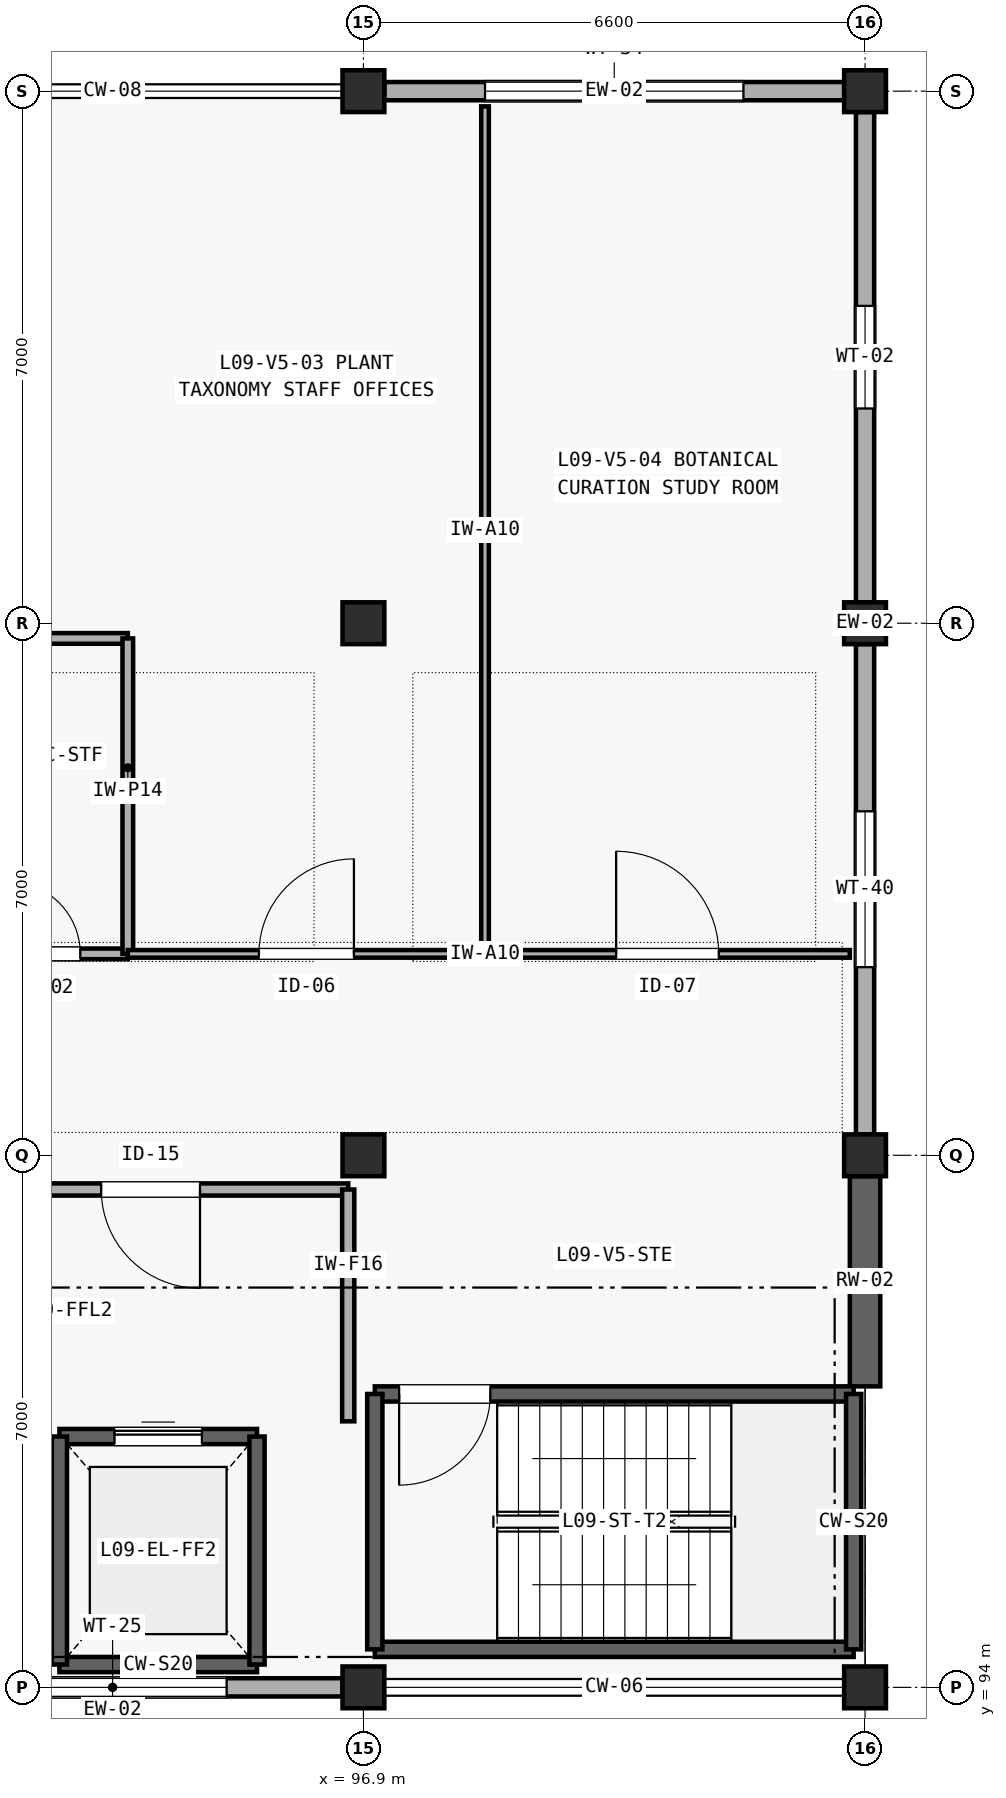
"""IFC4 building model, lengths in metres.
Left out: names, types, materials, properties, quantities, classifications, styles, units other than length and angle.
Written with IfcOpenShell. Run it as: python <this file> out.ifc"""

import sys

from ifc_helpers import new_model, si_unit, direction, frame, frame_2d, origin, origin_2d, place, context, subcontext, project, spatial, rectangle, extrude, element, fill, save


model = new_model("IFC4")
c1 = context("Model", 3, precision=1e-05, world=origin(), true_north=direction((0.0, 1.0)))
c2 = subcontext(c1, "Body", "Model", "MODEL_VIEW")
j1 = project(units=[si_unit("LENGTHUNIT", "METRE"), si_unit("PLANEANGLEUNIT", "RADIAN")], contexts=[c1])
p1 = place(None, origin())
s1 = spatial("IfcSite", under=j1, at=p1, CompositionType="ELEMENT")
p2 = place(p1, origin())
s2 = spatial("IfcBuilding", under=s1, at=p2, CompositionType="ELEMENT")
p3 = place(p2, frame((0.0, 0.0, 37.8)))
s3 = spatial("IfcBuildingStorey", under=s2, at=p3, CompositionType="ELEMENT", Elevation=37.8)
for number, where, z_axis, x_axis in (
    (1, (96.9, 94.0, 0.0), (0.0, 0.0, 1.0), (1.0, 0.0, 0.0)),
    (2, (96.9, 101.0, 0.0), (0.0, 0.0, 1.0), (1.0, 0.0, 0.0)),
    (3, (96.9, 108.0, 0.0), (0.0, 0.0, 1.0), (1.0, 0.0, 0.0)),
    (4, (96.9, 115.0, 0.0), (0.0, 0.0, 1.0), (1.0, 0.0, 0.0)),
    (5, (103.5, 94.0, 0.0), (0.0, 0.0, 1.0), (1.0, 0.0, 0.0)),
    (6, (103.5, 101.0, 0.0), (0.0, 0.0, 1.0), (1.0, 0.0, 0.0)),
    (7, (103.5, 108.0, 0.0), (0.0, 0.0, 1.0), (1.0, 0.0, 0.0)),
    (8, (103.5, 115.0, 0.0), (0.0, 0.0, 1.0), (1.0, 0.0, 0.0)),
):
    element("IfcColumn", number, at=place(p3, frame(where, z_axis=z_axis, x_axis=x_axis)), inside=s3, PredefinedType="COLUMN", context=c2, shape_type="SweptSolid", body=[
        extrude(rectangle(XDim=0.55, YDim=0.55, at=origin_2d()), origin(), (0.0, 0.0, 1.0), 4.2),
    ])
p4 = place(p3, frame((90.575, 94.0, 0.0), z_axis=(0.0, 0.0, 1.0), x_axis=(1.0, 0.0, 0.0)))
e9 = element("IfcWall", 9, at=p4, inside=s3, PredefinedType="SOLIDWALL", context=c2, shape_type="SweptSolid", body=[
    extrude(rectangle(XDim=6.05, YDim=0.24, at=frame_2d((3.025, 0.0))), origin(), (0.0, 0.0, 1.0), 3.385),
])
p5 = place(p4, frame((1.525, 0.0, 0.85)))
e10 = element("IfcOpeningElement", 10, at=p5, cuts=e9, PredefinedType="OPENING", context=c2, shape_type="SweptSolid", body=[
    extrude(rectangle(XDim=3.0, YDim=1.6, at=frame_2d((1.5, 0.8))), frame((0.0, 0.13, 0.0), z_axis=(0.0, -1.0, 0.0), x_axis=(1.0, 0.0, 0.0)), (0.0, 0.0, 1.0), 0.26),
])
p6 = place(p3, frame((97.175, 115.0, 0.0), z_axis=(0.0, 0.0, 1.0), x_axis=(1.0, 0.0, 0.0)))
e11 = element("IfcWall", 11, at=p6, inside=s3, PredefinedType="SOLIDWALL", context=c2, shape_type="SweptSolid", body=[
    extrude(rectangle(XDim=6.05, YDim=0.24, at=frame_2d((3.025, 0.0))), origin(), (0.0, 0.0, 1.0), 3.345),
])
p7 = place(p6, frame((1.325, 0.0, 0.85)))
e12 = element("IfcOpeningElement", 12, at=p7, cuts=e11, PredefinedType="OPENING", context=c2, shape_type="SweptSolid", body=[
    extrude(rectangle(XDim=3.4, YDim=1.2, at=frame_2d((1.7, 0.6))), frame((0.0, 0.13, 0.0), z_axis=(0.0, -1.0, 0.0), x_axis=(1.0, 0.0, 0.0)), (0.0, 0.0, 1.0), 0.26),
])
p8 = place(p3, frame((103.5, 97.96, 0.0), z_axis=(0.0, 0.0, 1.0), x_axis=(0.0, 1.0, 0.0)))
e13 = element("IfcWall", 13, at=p8, inside=s3, PredefinedType="SHEAR", context=c2, shape_type="SweptSolid", body=[
    extrude(rectangle(XDim=2.765, YDim=0.4, at=frame_2d((1.383, 0.0))), origin(), (0.0, 0.0, 1.0), 3.85),
])
p9 = place(p3, frame((103.5, 101.275, 0.0), z_axis=(0.0, 0.0, 1.0), x_axis=(0.0, 1.0, 0.0)))
e14 = element("IfcWall", 14, at=p9, inside=s3, PredefinedType="SOLIDWALL", context=c2, shape_type="SweptSolid", body=[
    extrude(rectangle(XDim=6.45, YDim=0.24, at=frame_2d((3.225, 0.0))), origin(), (0.0, 0.0, 1.0), 3.565),
])
p10 = place(p9, frame((2.2, 0.0, 0.85)))
e15 = element("IfcOpeningElement", 15, at=p10, cuts=e14, PredefinedType="OPENING", context=c2, shape_type="SweptSolid", body=[
    extrude(rectangle(XDim=2.05, YDim=1.55, at=frame_2d((1.025, 0.775))), frame((0.0, 0.13, 0.0), z_axis=(0.0, -1.0, 0.0), x_axis=(1.0, 0.0, 0.0)), (0.0, 0.0, 1.0), 0.26),
])
p11 = place(p3, frame((103.5, 108.275, 0.0), z_axis=(0.0, 0.0, 1.0), x_axis=(0.0, 1.0, 0.0)))
e16 = element("IfcWall", 16, at=p11, inside=s3, PredefinedType="SOLIDWALL", context=c2, shape_type="SweptSolid", body=[
    extrude(rectangle(XDim=6.45, YDim=0.24, at=frame_2d((3.225, 0.0))), origin(), (0.0, 0.0, 1.0), 3.565),
])
p12 = place(p11, frame((2.55, 0.0, 0.85)))
e17 = element("IfcOpeningElement", 17, at=p12, cuts=e16, PredefinedType="OPENING", context=c2, shape_type="SweptSolid", body=[
    extrude(rectangle(XDim=1.35, YDim=1.35, at=frame_2d((0.675, 0.675))), frame((0.0, 0.13, 0.0), z_axis=(0.0, -1.0, 0.0), x_axis=(1.0, 0.0, 0.0)), (0.0, 0.0, 1.0), 0.26),
])
p13 = place(p3, frame((97.05, 94.5, 0.0), z_axis=(0.0, 0.0, 1.0), x_axis=(1.0, 0.0, 0.0)))
e18 = element("IfcWall", 18, at=p13, inside=s3, PredefinedType="SHEAR", context=c2, shape_type="SweptSolid", body=[
    extrude(rectangle(XDim=6.3, YDim=0.2, at=frame_2d((3.15, 0.0))), origin(), (0.0, 0.0, 1.0), 4.2),
])
p14 = place(p3, frame((97.05, 97.86, 0.0), z_axis=(0.0, 0.0, 1.0), x_axis=(1.0, 0.0, 0.0)))
e19 = element("IfcWall", 19, at=p14, inside=s3, PredefinedType="SHEAR", context=c2, shape_type="SweptSolid", body=[
    extrude(rectangle(XDim=6.3, YDim=0.2, at=frame_2d((3.15, 0.0))), origin(), (0.0, 0.0, 1.0), 4.2),
])
p15 = place(p14, frame((0.32, 0.0, 0.0)))
e20 = element("IfcOpeningElement", 20, at=p15, cuts=e19, PredefinedType="OPENING", context=c2, shape_type="SweptSolid", body=[
    extrude(rectangle(XDim=1.2, YDim=2.15, at=frame_2d((0.6, 1.075))), frame((0.0, 0.11, 0.0), z_axis=(0.0, -1.0, 0.0), x_axis=(1.0, 0.0, 0.0)), (0.0, 0.0, 1.0), 0.22),
])
for number, where, z_axis, x_axis in (
    (21, (97.05, 94.5, 0.0), (0.0, 0.0, 1.0), (0.0, 1.0, 0.0)),
    (22, (103.35, 94.5, 0.0), (0.0, 0.0, 1.0), (0.0, 1.0, 0.0)),
):
    element("IfcWall", number, at=place(p3, frame(where, z_axis=z_axis, x_axis=x_axis)), inside=s3, PredefinedType="SHEAR", context=c2, shape_type="SweptSolid", body=[
        extrude(rectangle(XDim=3.36, YDim=0.2, at=frame_2d((1.68, 0.0))), origin(), (0.0, 0.0, 1.0), 4.2),
    ])
p16 = place(p3, frame((92.9, 94.3, 0.0), z_axis=(0.0, 0.0, 1.0), x_axis=(1.0, 0.0, 0.0)))
e23 = element("IfcWall", 23, at=p16, inside=s3, PredefinedType="SHEAR", context=c2, shape_type="SweptSolid", body=[
    extrude(rectangle(XDim=2.6, YDim=0.2, at=frame_2d((1.3, 0.0))), origin(), (0.0, 0.0, 1.0), 4.2),
])
p17 = place(p3, frame((92.9, 97.3, 0.0), z_axis=(0.0, 0.0, 1.0), x_axis=(1.0, 0.0, 0.0)))
e24 = element("IfcWall", 24, at=p17, inside=s3, PredefinedType="SHEAR", context=c2, shape_type="SweptSolid", body=[
    extrude(rectangle(XDim=2.6, YDim=0.2, at=frame_2d((1.3, 0.0))), origin(), (0.0, 0.0, 1.0), 4.2),
])
p18 = place(p17, frame((0.725, 0.0, 0.0)))
e25 = element("IfcOpeningElement", 25, at=p18, cuts=e24, PredefinedType="OPENING", context=c2, shape_type="SweptSolid", body=[
    extrude(rectangle(XDim=1.15, YDim=2.2, at=frame_2d((0.575, 1.1))), frame((0.0, 0.11, 0.0), z_axis=(0.0, -1.0, 0.0), x_axis=(1.0, 0.0, 0.0)), (0.0, 0.0, 1.0), 0.22),
])
for number, where, z_axis, x_axis in (
    (26, (92.9, 94.3, 0.0), (0.0, 0.0, 1.0), (0.0, 1.0, 0.0)),
    (27, (95.5, 94.3, 0.0), (0.0, 0.0, 1.0), (0.0, 1.0, 0.0)),
):
    element("IfcWall", number, at=place(p3, frame(where, z_axis=z_axis, x_axis=x_axis)), inside=s3, PredefinedType="SHEAR", context=c2, shape_type="SweptSolid", body=[
        extrude(rectangle(XDim=3.0, YDim=0.2, at=frame_2d((1.5, 0.0))), origin(), (0.0, 0.0, 1.0), 4.2),
    ])
p19 = place(p3, frame((91.5, 100.55, 0.0), z_axis=(0.0, 0.0, 1.0), x_axis=(1.0, 0.0, 0.0)))
e28 = element("IfcWall", 28, at=p19, inside=s3, PredefinedType="SOLIDWALL", context=c2, shape_type="SweptSolid", body=[
    extrude(rectangle(XDim=5.2, YDim=0.16, at=frame_2d((2.6, 0.0))), origin(), (0.0, 0.0, 1.0), 3.9),
])
p20 = place(p19, frame((1.95, 0.0, 0.0)))
e29 = element("IfcOpeningElement", 29, at=p20, cuts=e28, PredefinedType="OPENING", context=c2, shape_type="SweptSolid", body=[
    extrude(rectangle(XDim=1.3, YDim=2.15, at=frame_2d((0.65, 1.075))), frame((0.0, 0.09, 0.0), z_axis=(0.0, -1.0, 0.0), x_axis=(1.0, 0.0, 0.0)), (0.0, 0.0, 1.0), 0.18),
])
p21 = place(p3, frame((96.7, 97.5, 0.0), z_axis=(0.0, 0.0, 1.0), x_axis=(0.0, 1.0, 0.0)))
e30 = element("IfcWall", 30, at=p21, inside=s3, PredefinedType="SOLIDWALL", context=c2, shape_type="SweptSolid", body=[
    extrude(rectangle(XDim=3.05, YDim=0.16, at=frame_2d((1.525, 0.0))), origin(), (0.0, 0.0, 1.0), 3.405),
])
p22 = place(p3, frame((91.6, 103.65, 0.0), z_axis=(0.0, 0.0, 1.0), x_axis=(1.0, 0.0, 0.0)))
e31 = element("IfcWall", 31, at=p22, inside=s3, PredefinedType="PLUMBINGWALL", context=c2, shape_type="SweptSolid", body=[
    extrude(rectangle(XDim=2.2, YDim=0.14, at=frame_2d((1.1, 0.0))), origin(), (0.0, 0.0, 1.0), 3.9),
])
p23 = place(p22, frame((0.625, 0.0, 0.0)))
e32 = element("IfcOpeningElement", 32, at=p23, cuts=e31, PredefinedType="OPENING", context=c2, shape_type="SweptSolid", body=[
    extrude(rectangle(XDim=0.95, YDim=2.1, at=frame_2d((0.475, 1.05))), frame((0.0, 0.08, 0.0), z_axis=(0.0, -1.0, 0.0), x_axis=(1.0, 0.0, 0.0)), (0.0, 0.0, 1.0), 0.16),
])
p24 = place(p3, frame((91.6, 107.8, 0.0), z_axis=(0.0, 0.0, 1.0), x_axis=(1.0, 0.0, 0.0)))
e33 = element("IfcWall", 33, at=p24, inside=s3, PredefinedType="PLUMBINGWALL", context=c2, shape_type="SweptSolid", body=[
    extrude(rectangle(XDim=2.2, YDim=0.14, at=frame_2d((1.1, 0.0))), origin(), (0.0, 0.0, 1.0), 3.385),
])
p25 = place(p3, frame((93.8, 103.65, 0.0), z_axis=(0.0, 0.0, 1.0), x_axis=(0.0, 1.0, 0.0)))
e34 = element("IfcWall", 34, at=p25, inside=s3, PredefinedType="PLUMBINGWALL", context=c2, shape_type="SweptSolid", body=[
    extrude(rectangle(XDim=4.15, YDim=0.14, at=frame_2d((2.075, 0.0))), origin(), (0.0, 0.0, 1.0), 3.9),
])
p26 = place(p3, frame((93.8, 103.65, 0.0), z_axis=(0.0, 0.0, 1.0), x_axis=(1.0, 0.0, 0.0)))
e35 = element("IfcWall", 35, at=p26, inside=s3, PredefinedType="PARTITIONING", context=c2, shape_type="SweptSolid", body=[
    extrude(rectangle(XDim=4.7, YDim=0.1, at=frame_2d((2.35, 0.0))), origin(), (0.0, 0.0, 1.0), 3.9),
])
p27 = place(p26, frame((1.725, 0.0, 0.0)))
e36 = element("IfcOpeningElement", 36, at=p27, cuts=e35, PredefinedType="OPENING", context=c2, shape_type="SweptSolid", body=[
    extrude(rectangle(XDim=1.25, YDim=2.15, at=frame_2d((0.625, 1.075))), frame((0.0, 0.06, 0.0), z_axis=(0.0, -1.0, 0.0), x_axis=(1.0, 0.0, 0.0)), (0.0, 0.0, 1.0), 0.12),
])
p28 = place(p3, frame((98.5, 103.65, 0.0), z_axis=(0.0, 0.0, 1.0), x_axis=(0.0, 1.0, 0.0)))
e37 = element("IfcWall", 37, at=p28, inside=s3, PredefinedType="PARTITIONING", context=c2, shape_type="SweptSolid", body=[
    extrude(rectangle(XDim=11.15, YDim=0.1, at=frame_2d((5.575, 0.0))), origin(), (0.0, 0.0, 1.0), 3.9),
])
p29 = place(p3, frame((98.5, 103.65, 0.0), z_axis=(0.0, 0.0, 1.0), x_axis=(1.0, 0.0, 0.0)))
e38 = element("IfcWall", 38, at=p29, inside=s3, PredefinedType="PARTITIONING", context=c2, shape_type="SweptSolid", body=[
    extrude(rectangle(XDim=4.8, YDim=0.1, at=frame_2d((2.4, 0.0))), origin(), (0.0, 0.0, 1.0), 3.9),
])
p30 = place(p29, frame((1.725, 0.0, 0.0)))
e39 = element("IfcOpeningElement", 39, at=p30, cuts=e38, PredefinedType="OPENING", context=c2, shape_type="SweptSolid", body=[
    extrude(rectangle(XDim=1.35, YDim=2.2, at=frame_2d((0.675, 1.1))), frame((0.0, 0.06, 0.0), z_axis=(0.0, -1.0, 0.0), x_axis=(1.0, 0.0, 0.0)), (0.0, 0.0, 1.0), 0.12),
])
p31 = place(p5, origin())
e40 = element("IfcWindow", 40, at=p31, inside=s3, PartitioningType="SINGLE_PANEL", PredefinedType="WINDOW", context=c2, shape_type="SweptSolid", body=[
    extrude(rectangle(XDim=3.0, YDim=1.6, at=frame_2d((1.5, 0.8))), frame((0.0, 0.03, 0.0), z_axis=(0.0, -1.0, 0.0), x_axis=(1.0, 0.0, 0.0)), (0.0, 0.0, 1.0), 0.06),
])
fill(e10, e40)
p32 = place(p7, origin())
e41 = element("IfcWindow", 41, at=p32, inside=s3, PartitioningType="SINGLE_PANEL", PredefinedType="WINDOW", context=c2, shape_type="SweptSolid", body=[
    extrude(rectangle(XDim=3.4, YDim=1.2, at=frame_2d((1.7, 0.6))), frame((0.0, 0.03, 0.0), z_axis=(0.0, -1.0, 0.0), x_axis=(1.0, 0.0, 0.0)), (0.0, 0.0, 1.0), 0.06),
])
fill(e12, e41)
p33 = place(p10, origin())
e42 = element("IfcWindow", 42, at=p33, inside=s3, PartitioningType="SINGLE_PANEL", PredefinedType="WINDOW", context=c2, shape_type="SweptSolid", body=[
    extrude(rectangle(XDim=2.05, YDim=1.55, at=frame_2d((1.025, 0.775))), frame((0.0, 0.03, 0.0), z_axis=(0.0, -1.0, 0.0), x_axis=(1.0, 0.0, 0.0)), (0.0, 0.0, 1.0), 0.06),
])
fill(e15, e42)
p34 = place(p12, origin())
e43 = element("IfcWindow", 43, at=p34, inside=s3, PartitioningType="SINGLE_PANEL", PredefinedType="WINDOW", context=c2, shape_type="SweptSolid", body=[
    extrude(rectangle(XDim=1.35, YDim=1.35, at=frame_2d((0.675, 0.675))), frame((0.0, 0.03, 0.0), z_axis=(0.0, -1.0, 0.0), x_axis=(1.0, 0.0, 0.0)), (0.0, 0.0, 1.0), 0.06),
])
fill(e17, e43)
p35 = place(p15, frame((1.2, 0.0, 0.0), z_axis=(0.0, 0.0, 1.0), x_axis=(-1.0, 0.0, 0.0)))
e44 = element("IfcDoor", 44, at=p35, inside=s3, OperationType="SINGLE_SWING_RIGHT", PredefinedType="DOOR", context=c2, shape_type="SweptSolid", body=[
    extrude(rectangle(XDim=1.2, YDim=2.15, at=frame_2d((0.6, 1.075))), frame((0.0, 0.025, 0.0), z_axis=(0.0, -1.0, 0.0), x_axis=(1.0, 0.0, 0.0)), (0.0, 0.0, 1.0), 0.05),
])
fill(e20, e44)
p36 = place(p18, origin())
e45 = element("IfcDoor", 45, at=p36, inside=s3, OperationType="SLIDING_TO_LEFT", PredefinedType="DOOR", context=c2, shape_type="SweptSolid", body=[
    extrude(rectangle(XDim=1.15, YDim=2.2, at=frame_2d((0.575, 1.1))), frame((0.0, 0.025, 0.0), z_axis=(0.0, -1.0, 0.0), x_axis=(1.0, 0.0, 0.0)), (0.0, 0.0, 1.0), 0.05),
])
fill(e25, e45)
p37 = place(p20, frame((1.3, 0.0, 0.0), z_axis=(0.0, 0.0, 1.0), x_axis=(-1.0, 0.0, 0.0)))
e46 = element("IfcDoor", 46, at=p37, inside=s3, OperationType="SINGLE_SWING_LEFT", PredefinedType="DOOR", context=c2, shape_type="SweptSolid", body=[
    extrude(rectangle(XDim=1.3, YDim=2.15, at=frame_2d((0.65, 1.075))), frame((0.0, 0.025, 0.0), z_axis=(0.0, -1.0, 0.0), x_axis=(1.0, 0.0, 0.0)), (0.0, 0.0, 1.0), 0.05),
])
fill(e29, e46)
p38 = place(p23, origin())
e47 = element("IfcDoor", 47, at=p38, inside=s3, OperationType="SINGLE_SWING_LEFT", PredefinedType="DOOR", context=c2, shape_type="SweptSolid", body=[
    extrude(rectangle(XDim=0.95, YDim=2.1, at=frame_2d((0.475, 1.05))), frame((0.0, 0.025, 0.0), z_axis=(0.0, -1.0, 0.0), x_axis=(1.0, 0.0, 0.0)), (0.0, 0.0, 1.0), 0.05),
])
fill(e32, e47)
p39 = place(p27, origin())
e48 = element("IfcDoor", 48, at=p39, inside=s3, OperationType="SINGLE_SWING_RIGHT", PredefinedType="DOOR", context=c2, shape_type="SweptSolid", body=[
    extrude(rectangle(XDim=1.25, YDim=2.15, at=frame_2d((0.625, 1.075))), frame((0.0, 0.025, 0.0), z_axis=(0.0, -1.0, 0.0), x_axis=(1.0, 0.0, 0.0)), (0.0, 0.0, 1.0), 0.05),
])
fill(e36, e48)
p40 = place(p30, origin())
e49 = element("IfcDoor", 49, at=p40, inside=s3, OperationType="SINGLE_SWING_LEFT", PredefinedType="DOOR", context=c2, shape_type="SweptSolid", body=[
    extrude(rectangle(XDim=1.35, YDim=2.2, at=frame_2d((0.675, 1.1))), frame((0.0, 0.025, 0.0), z_axis=(0.0, -1.0, 0.0), x_axis=(1.0, 0.0, 0.0)), (0.0, 0.0, 1.0), 0.05),
])
fill(e39, e49)
save(model, sys.argv[1])
